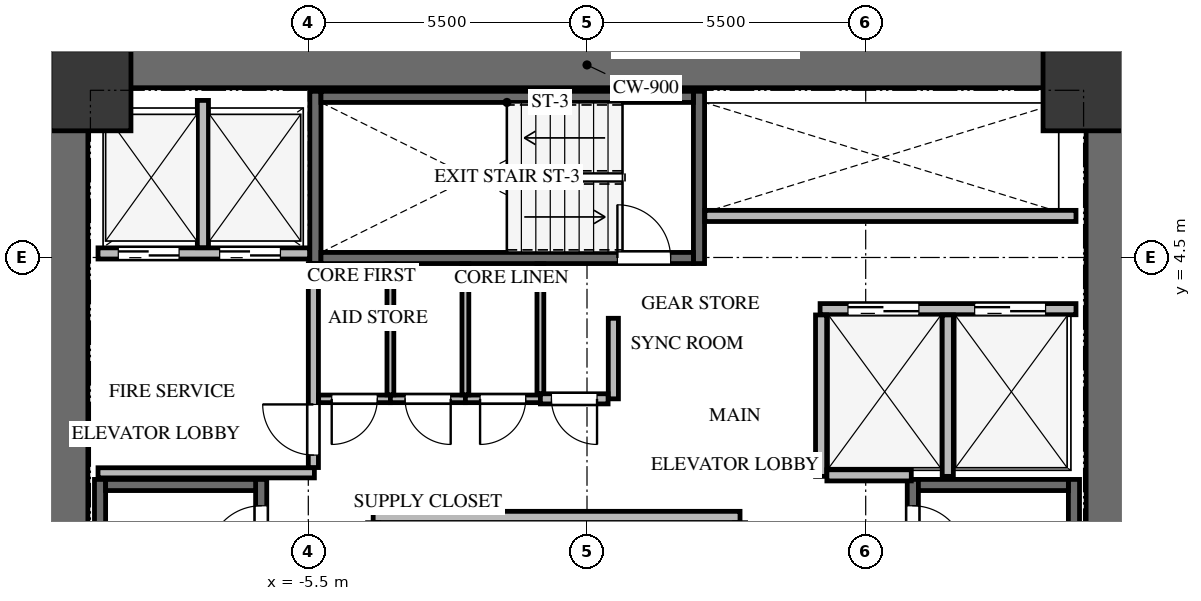
"""IFC4 building model, lengths in metres.
Left out: names, types, materials, properties, quantities, classifications, styles, units other than length and angle.
Written with IfcOpenShell. Run it as: python <this file> out.ifc"""

import sys

from ifc_helpers import new_model, si_unit, direction, frame, frame_2d, origin, origin_2d, place, context, subcontext, project, spatial, rectangle, extrude, source, transform, mapped, element, fill, save


model = new_model("IFC4")
c1 = context("Model", 3, precision=1e-05, world=origin(), true_north=direction((0.0, 1.0)))
c2 = subcontext(c1, "Body", "Model", "MODEL_VIEW")
j1 = project(units=[si_unit("LENGTHUNIT", "METRE"), si_unit("PLANEANGLEUNIT", "RADIAN")], contexts=[c1])
p1 = place(None, origin())
s1 = spatial("IfcSite", under=j1, at=p1, CompositionType="ELEMENT")
p2 = place(p1, origin())
s2 = spatial("IfcBuilding", under=s1, at=p2, CompositionType="ELEMENT")
p3 = place(p2, frame((0.0, 0.0, 81.3)))
s3 = spatial("IfcBuildingStorey", under=s2, at=p3, CompositionType="ELEMENT", Elevation=81.3)
for number, where, z_axis, x_axis in (
    (1, (-10.3, -8.75, 0.0), (0.0, 0.0, 1.0), (0.0, 1.0, 0.0)),
    (2, (10.3, -8.75, 0.0), (0.0, 0.0, 1.0), (0.0, 1.0, 0.0)),
):
    element("IfcWall", number, at=place(p3, frame(where, z_axis=z_axis, x_axis=x_axis)), inside=s3, PredefinedType="SHEAR", context=c2, shape_type="SweptSolid", body=[
        extrude(rectangle(XDim=17.5, YDim=0.9, at=frame_2d((8.75, 0.0))), origin(), (0.0, 0.0, 1.0), 3.0),
    ])
p4 = place(p3, frame((-9.85, 8.3, 0.0), z_axis=(0.0, 0.0, 1.0), x_axis=(1.0, 0.0, 0.0)))
e3 = element("IfcWall", 3, at=p4, inside=s3, PredefinedType="SHEAR", context=c2, shape_type="SweptSolid", body=[
    extrude(rectangle(XDim=19.7, YDim=0.9, at=frame_2d((9.85, 0.0))), origin(), (0.0, 0.0, 1.0), 3.0),
])
p5 = place(p3, frame((-6.43, -7.77, -0.24), z_axis=(0.0, 0.0, 1.0), x_axis=(0.0, 1.0, 0.0)))
e4 = element("IfcWall", 4, at=p5, inside=s3, PredefinedType="SHEAR", context=c2, shape_type="SweptSolid", body=[
    extrude(rectangle(XDim=7.89, YDim=0.22, at=frame_2d((3.945, 0.0))), origin(), (0.0, 0.0, 1.0), 3.0),
])
p6 = place(p5, frame((6.32, 0.0, 0.0)))
e5 = element("IfcOpeningElement", 5, at=p6, cuts=e4, PredefinedType="OPENING", context=c2, shape_type="SweptSolid", body=[
    extrude(rectangle(XDim=1.05, YDim=2.15, at=frame_2d((0.525, 1.075))), frame((0.0, 0.12, 0.0), z_axis=(0.0, -1.0, 0.0), x_axis=(1.0, 0.0, 0.0)), (0.0, 0.0, 1.0), 0.24),
])
p7 = place(p3, frame((-9.61, 0.12, -0.24), z_axis=(0.0, 0.0, 1.0), x_axis=(0.0, -1.0, 0.0)))
e6 = element("IfcWall", 6, at=p7, inside=s3, PredefinedType="SHEAR", context=c2, shape_type="SweptSolid", body=[
    extrude(rectangle(XDim=7.89, YDim=0.22, at=frame_2d((3.945, 0.0))), origin(), (0.0, 0.0, 1.0), 3.0),
])
p8 = place(p3, frame((-6.54, 0.01, -0.24), z_axis=(0.0, 0.0, 1.0), x_axis=(-1.0, 0.0, 0.0)))
e7 = element("IfcWall", 7, at=p8, inside=s3, PredefinedType="SHEAR", context=c2, shape_type="SweptSolid", body=[
    extrude(rectangle(XDim=2.96, YDim=0.22, at=frame_2d((1.48, 0.0))), origin(), (0.0, 0.0, 1.0), 3.0),
])
p9 = place(p3, frame((9.61, -7.77, -0.24), z_axis=(0.0, 0.0, 1.0), x_axis=(0.0, 1.0, 0.0)))
e8 = element("IfcWall", 8, at=p9, inside=s3, PredefinedType="SHEAR", context=c2, shape_type="SweptSolid", body=[
    extrude(rectangle(XDim=7.89, YDim=0.22, at=frame_2d((3.945, 0.0))), origin(), (0.0, 0.0, 1.0), 3.0),
])
p10 = place(p3, frame((6.43, 0.12, -0.24), z_axis=(0.0, 0.0, 1.0), x_axis=(0.0, -1.0, 0.0)))
e9 = element("IfcWall", 9, at=p10, inside=s3, PredefinedType="SHEAR", context=c2, shape_type="SweptSolid", body=[
    extrude(rectangle(XDim=7.89, YDim=0.22, at=frame_2d((3.945, 0.0))), origin(), (0.0, 0.0, 1.0), 3.0),
])
p11 = place(p10, frame((0.52, 0.0, 0.0)))
e10 = element("IfcOpeningElement", 10, at=p11, cuts=e9, PredefinedType="OPENING", context=c2, shape_type="SweptSolid", body=[
    extrude(rectangle(XDim=1.05, YDim=2.15, at=frame_2d((0.525, 1.075))), frame((0.0, 0.12, 0.0), z_axis=(0.0, -1.0, 0.0), x_axis=(1.0, 0.0, 0.0)), (0.0, 0.0, 1.0), 0.24),
])
p12 = place(p3, frame((9.5, 0.01, -0.24), z_axis=(0.0, 0.0, 1.0), x_axis=(-1.0, 0.0, 0.0)))
e11 = element("IfcWall", 11, at=p12, inside=s3, PredefinedType="SHEAR", context=c2, shape_type="SweptSolid", body=[
    extrude(rectangle(XDim=2.96, YDim=0.22, at=frame_2d((1.48, 0.0))), origin(), (0.0, 0.0, 1.0), 3.0),
])
for number, where, z_axis, x_axis in (
    (12, (2.21, 4.38, -0.24), (0.0, 0.0, 1.0), (0.0, 1.0, 0.0)),
    (13, (-5.36, 7.78, -0.24), (0.0, 0.0, 1.0), (0.0, -1.0, 0.0)),
):
    element("IfcWall", number, at=place(p3, frame(where, z_axis=z_axis, x_axis=x_axis)), inside=s3, PredefinedType="SHEAR", context=c2, shape_type="SweptSolid", body=[
        extrude(rectangle(XDim=3.4, YDim=0.22, at=frame_2d((1.7, 0.0))), origin(), (0.0, 0.0, 1.0), 3.0),
    ])
p13 = place(p3, frame((-5.25, 4.49, -0.24), z_axis=(0.0, 0.0, 1.0), x_axis=(1.0, 0.0, 0.0)))
e14 = element("IfcWall", 14, at=p13, inside=s3, PredefinedType="SHEAR", context=c2, shape_type="SweptSolid", body=[
    extrude(rectangle(XDim=7.35, YDim=0.22, at=frame_2d((3.675, 0.0))), origin(), (0.0, 0.0, 1.0), 3.0),
])
p14 = place(p13, frame((5.85, 0.0, 0.0)))
e15 = element("IfcOpeningElement", 15, at=p14, cuts=e14, PredefinedType="OPENING", context=c2, shape_type="SweptSolid", body=[
    extrude(rectangle(XDim=1.05, YDim=2.15, at=frame_2d((0.525, 1.075))), frame((0.0, 0.12, 0.0), z_axis=(0.0, -1.0, 0.0), x_axis=(1.0, 0.0, 0.0)), (0.0, 0.0, 1.0), 0.24),
])
p15 = place(p3, frame((2.1, 7.67, -0.24), z_axis=(0.0, 0.0, 1.0), x_axis=(-1.0, 0.0, 0.0)))
e16 = element("IfcWall", 16, at=p15, inside=s3, PredefinedType="SHEAR", context=c2, shape_type="SweptSolid", body=[
    extrude(rectangle(XDim=7.35, YDim=0.22, at=frame_2d((3.675, 0.0))), origin(), (0.0, 0.0, 1.0), 3.0),
])
m1 = source(origin(), c2, "Body", "SweptSolid", [
    extrude(rectangle(XDim=1.6, YDim=1.6, at=origin_2d()), origin(), (0.0, 0.0, 1.0), 3.0),
])
for number, where, z_axis, x_axis in (
    (17, (9.8, 7.8, -0.24), (0.0, 0.0, 1.0), (1.0, 0.0, 0.0)),
    (18, (-9.8, 7.8, -0.24), (0.0, 0.0, 1.0), (1.0, 0.0, 0.0)),
):
    element("IfcColumn", number, at=place(p3, frame(where, z_axis=z_axis, x_axis=x_axis)), inside=s3, PredefinedType="COLUMN", context=c2, shape_type="MappedRepresentation", body=[
        mapped(m1, transform((0.0, 0.0, 0.0), x_axis=(1.0, 0.0, 0.0), y_axis=(0.0, 1.0, 0.0), z_axis=(0.0, 0.0, 1.0), scale=1.0)),
    ])
p16 = place(p3, frame((-9.65, 4.58, 0.0), z_axis=(0.0, 0.0, 1.0), x_axis=(1.0, 0.0, 0.0)))
e19 = element("IfcWall", 19, at=p16, inside=s3, PredefinedType="SOLIDWALL", context=c2, shape_type="SweptSolid", body=[
    extrude(rectangle(XDim=4.175, YDim=0.22, at=frame_2d((2.087, 0.0))), origin(), (0.0, 0.0, 1.0), 2.745),
])
p17 = place(p16, frame((0.4, 0.0, 0.0)))
e20 = element("IfcOpeningElement", 20, at=p17, cuts=e19, PredefinedType="OPENING", context=c2, shape_type="SweptSolid", body=[
    extrude(rectangle(XDim=1.2, YDim=2.15, at=frame_2d((0.6, 1.075))), frame((0.0, 0.12, 0.0), z_axis=(0.0, -1.0, 0.0), x_axis=(1.0, 0.0, 0.0)), (0.0, 0.0, 1.0), 0.24),
])
p18 = place(p16, frame((2.4, 0.0, 0.0)))
e21 = element("IfcOpeningElement", 21, at=p18, cuts=e19, PredefinedType="OPENING", context=c2, shape_type="SweptSolid", body=[
    extrude(rectangle(XDim=1.2, YDim=2.15, at=frame_2d((0.6, 1.075))), frame((0.0, 0.12, 0.0), z_axis=(0.0, -1.0, 0.0), x_axis=(1.0, 0.0, 0.0)), (0.0, 0.0, 1.0), 0.24),
])
p19 = place(p3, frame((-7.58, 4.694, 0.0), z_axis=(0.0, 0.0, 1.0), x_axis=(0.0, 1.0, 0.0)))
e22 = element("IfcWall", 22, at=p19, inside=s3, PredefinedType="SOLIDWALL", context=c2, shape_type="SweptSolid", body=[
    extrude(rectangle(XDim=2.906, YDim=0.22, at=frame_2d((1.453, 0.0))), origin(), (0.0, 0.0, 1.0), 2.745),
])
p20 = place(p3, frame((-9.65, 0.25, 0.0), z_axis=(0.0, 0.0, 1.0), x_axis=(1.0, 0.0, 0.0)))
e23 = element("IfcWall", 23, at=p20, inside=s3, PredefinedType="SOLIDWALL", context=c2, shape_type="SweptSolid", body=[
    extrude(rectangle(XDim=4.27, YDim=0.2, at=frame_2d((2.135, 0.0))), origin(), (0.0, 0.0, 1.0), 2.745),
])
p21 = place(p3, frame((-5.4, 0.354, 0.0), z_axis=(0.0, 0.0, 1.0), x_axis=(0.0, 1.0, 0.0)))
e24 = element("IfcWall", 24, at=p21, inside=s3, PredefinedType="SOLIDWALL", context=c2, shape_type="SweptSolid", body=[
    extrude(rectangle(XDim=4.026, YDim=0.2, at=frame_2d((2.013, 0.0))), origin(), (0.0, 0.0, 1.0), 2.745),
])
p22 = place(p21, frame((0.246, 0.0, 0.0)))
e25 = element("IfcOpeningElement", 25, at=p22, cuts=e24, PredefinedType="OPENING", context=c2, shape_type="SweptSolid", body=[
    extrude(rectangle(XDim=1.0, YDim=2.15, at=frame_2d((0.5, 1.075))), frame((0.0, 0.11, 0.0), z_axis=(0.0, -1.0, 0.0), x_axis=(1.0, 0.0, 0.0)), (0.0, 0.0, 1.0), 0.22),
])
p23 = place(p3, frame((4.6, 3.48, 0.0), z_axis=(0.0, 0.0, 1.0), x_axis=(1.0, 0.0, 0.0)))
e26 = element("IfcWall", 26, at=p23, inside=s3, PredefinedType="SOLIDWALL", context=c2, shape_type="SweptSolid", body=[
    extrude(rectangle(XDim=5.05, YDim=0.22, at=frame_2d((2.525, 0.0))), origin(), (0.0, 0.0, 1.0), 2.745),
])
p24 = place(p23, frame((0.55, 0.0, 0.0)))
e27 = element("IfcOpeningElement", 27, at=p24, cuts=e26, PredefinedType="OPENING", context=c2, shape_type="SweptSolid", body=[
    extrude(rectangle(XDim=1.4, YDim=2.15, at=frame_2d((0.7, 1.075))), frame((0.0, 0.12, 0.0), z_axis=(0.0, -1.0, 0.0), x_axis=(1.0, 0.0, 0.0)), (0.0, 0.0, 1.0), 0.24),
])
p25 = place(p23, frame((3.05, 0.0, 0.0)))
e28 = element("IfcOpeningElement", 28, at=p25, cuts=e26, PredefinedType="OPENING", context=c2, shape_type="SweptSolid", body=[
    extrude(rectangle(XDim=1.4, YDim=2.15, at=frame_2d((0.7, 1.075))), frame((0.0, 0.12, 0.0), z_axis=(0.0, -1.0, 0.0), x_axis=(1.0, 0.0, 0.0)), (0.0, 0.0, 1.0), 0.24),
])
for number, where, z_axis, x_axis in (
    (29, (4.62, 0.18, 0.0), (0.0, 0.0, 1.0), (0.0, 1.0, 0.0)),
    (30, (7.12, 0.18, 0.0), (0.0, 0.0, 1.0), (0.0, 1.0, 0.0)),
):
    element("IfcWall", number, at=place(p3, frame(where, z_axis=z_axis, x_axis=x_axis)), inside=s3, PredefinedType="SOLIDWALL", context=c2, shape_type="SweptSolid", body=[
        extrude(rectangle(XDim=3.186, YDim=0.22, at=frame_2d((1.593, 0.0))), origin(), (0.0, 0.0, 1.0), 2.745),
    ])
p26 = place(p3, frame((4.734, 0.2, 0.0), z_axis=(0.0, 0.0, 1.0), x_axis=(1.0, 0.0, 0.0)))
e31 = element("IfcWall", 31, at=p26, inside=s3, PredefinedType="SOLIDWALL", context=c2, shape_type="SweptSolid", body=[
    extrude(rectangle(XDim=1.666, YDim=0.22, at=frame_2d((0.833, 0.0))), origin(), (0.0, 0.0, 1.0), 2.745),
])
p27 = place(p3, frame((-4.22, -0.62, 0.0), z_axis=(0.0, 0.0, 1.0), x_axis=(1.0, 0.0, 0.0)))
e32 = element("IfcWall", 32, at=p27, inside=s3, PredefinedType="SOLIDWALL", context=c2, shape_type="SweptSolid", body=[
    extrude(rectangle(XDim=7.24, YDim=0.22, at=frame_2d((3.62, 0.0))), origin(), (0.0, 0.0, 1.0), 2.745),
])
p28 = place(p3, frame((2.325, 5.32, 0.0), z_axis=(0.0, 0.0, 1.0), x_axis=(1.0, 0.0, 0.0)))
e33 = element("IfcWall", 33, at=p28, inside=s3, PredefinedType="SOLIDWALL", context=c2, shape_type="SweptSolid", body=[
    extrude(rectangle(XDim=7.325, YDim=0.22, at=frame_2d((3.663, 0.0))), origin(), (0.0, 0.0, 1.0), 2.745),
])
p29 = place(p3, frame((-3.88, 1.71, 0.0), z_axis=(0.0, 0.0, 1.0), x_axis=(-1.0, 0.0, 0.0)))
e34 = element("IfcWall", 34, at=p29, inside=s3, PredefinedType="PARTITIONING", context=c2, shape_type="SweptSolid", body=[
    extrude(rectangle(XDim=1.416, YDim=0.15, at=frame_2d((0.708, 0.0))), origin(), (0.0, 0.0, 1.0), 2.745),
])
p30 = place(p29, frame((0.258, 0.0, 0.0)))
e35 = element("IfcOpeningElement", 35, at=p30, cuts=e34, PredefinedType="OPENING", context=c2, shape_type="SweptSolid", body=[
    extrude(rectangle(XDim=0.9, YDim=2.05, at=frame_2d((0.45, 1.025))), frame((0.0, 0.085, 0.0), z_axis=(0.0, -1.0, 0.0), x_axis=(1.0, 0.0, 0.0)), (0.0, 0.0, 1.0), 0.17),
])
p31 = place(p3, frame((-2.4, 1.71, 0.0), z_axis=(0.0, 0.0, 1.0), x_axis=(-1.0, 0.0, 0.0)))
e36 = element("IfcWall", 36, at=p31, inside=s3, PredefinedType="PARTITIONING", context=c2, shape_type="SweptSolid", body=[
    extrude(rectangle(XDim=1.48, YDim=0.15, at=frame_2d((0.74, 0.0))), origin(), (0.0, 0.0, 1.0), 2.745),
])
p32 = place(p31, frame((0.29, 0.0, 0.0)))
e37 = element("IfcOpeningElement", 37, at=p32, cuts=e36, PredefinedType="OPENING", context=c2, shape_type="SweptSolid", body=[
    extrude(rectangle(XDim=0.9, YDim=2.05, at=frame_2d((0.45, 1.025))), frame((0.0, 0.085, 0.0), z_axis=(0.0, -1.0, 0.0), x_axis=(1.0, 0.0, 0.0)), (0.0, 0.0, 1.0), 0.17),
])
p33 = place(p3, frame((-0.92, 1.71, 0.0), z_axis=(0.0, 0.0, 1.0), x_axis=(-1.0, 0.0, 0.0)))
e38 = element("IfcWall", 38, at=p33, inside=s3, PredefinedType="PARTITIONING", context=c2, shape_type="SweptSolid", body=[
    extrude(rectangle(XDim=1.48, YDim=0.15, at=frame_2d((0.74, 0.0))), origin(), (0.0, 0.0, 1.0), 2.745),
])
p34 = place(p33, frame((0.29, 0.0, 0.0)))
e39 = element("IfcOpeningElement", 39, at=p34, cuts=e38, PredefinedType="OPENING", context=c2, shape_type="SweptSolid", body=[
    extrude(rectangle(XDim=0.9, YDim=2.05, at=frame_2d((0.45, 1.025))), frame((0.0, 0.085, 0.0), z_axis=(0.0, -1.0, 0.0), x_axis=(1.0, 0.0, 0.0)), (0.0, 0.0, 1.0), 0.17),
])
p35 = place(p3, frame((0.52, 3.3, 0.0), z_axis=(0.0, 0.0, 1.0), x_axis=(0.0, -1.0, 0.0)))
e40 = element("IfcWall", 40, at=p35, inside=s3, PredefinedType="SOLIDWALL", context=c2, shape_type="SweptSolid", body=[
    extrude(rectangle(XDim=1.59, YDim=0.2, at=frame_2d((0.795, 0.0))), origin(), (0.0, 0.0, 1.0), 2.745),
])
p36 = place(p3, frame((0.416, 1.71, 0.0), z_axis=(0.0, 0.0, 1.0), x_axis=(-1.0, 0.0, 0.0)))
e41 = element("IfcWall", 41, at=p36, inside=s3, PredefinedType="SOLIDWALL", context=c2, shape_type="SweptSolid", body=[
    extrude(rectangle(XDim=1.336, YDim=0.2, at=frame_2d((0.668, 0.0))), origin(), (0.0, 0.0, 1.0), 2.745),
])
p37 = place(p36, frame((0.218, 0.0, 0.0)))
e42 = element("IfcOpeningElement", 42, at=p37, cuts=e41, PredefinedType="OPENING", context=c2, shape_type="SweptSolid", body=[
    extrude(rectangle(XDim=0.9, YDim=2.05, at=frame_2d((0.45, 1.025))), frame((0.0, 0.11, 0.0), z_axis=(0.0, -1.0, 0.0), x_axis=(1.0, 0.0, 0.0)), (0.0, 0.0, 1.0), 0.22),
])
for number, where, z_axis, x_axis in (
    (43, (-3.88, 4.375, 0.0), (0.0, 0.0, 1.0), (0.0, -1.0, 0.0)),
    (44, (-2.4, 4.375, 0.0), (0.0, 0.0, 1.0), (0.0, -1.0, 0.0)),
):
    element("IfcWall", number, at=place(p3, frame(where, z_axis=z_axis, x_axis=x_axis)), inside=s3, PredefinedType="PARTITIONING", context=c2, shape_type="SweptSolid", body=[
        extrude(rectangle(XDim=2.586, YDim=0.135, at=frame_2d((1.293, 0.0))), origin(), (0.0, 0.0, 1.0), 2.745),
    ])
p38 = place(p3, frame((-0.92, 4.375, 0.0), z_axis=(0.0, 0.0, 1.0), x_axis=(0.0, -1.0, 0.0)))
e45 = element("IfcWall", 45, at=p38, inside=s3, PredefinedType="PARTITIONING", context=c2, shape_type="SweptSolid", body=[
    extrude(rectangle(XDim=2.561, YDim=0.135, at=frame_2d((1.281, 0.0))), origin(), (0.0, 0.0, 1.0), 2.745),
])
m2 = source(origin(), c2, "Body", "SweptSolid", [
    extrude(rectangle(XDim=1.05, YDim=2.15, at=frame_2d((0.525, 1.075))), frame((0.0, 0.025, 0.0), z_axis=(0.0, -1.0, 0.0), x_axis=(1.0, 0.0, 0.0)), (0.0, 0.0, 1.0), 0.05),
])
p39 = place(p6, origin())
e46 = element("IfcDoor", 46, at=p39, inside=s3, OperationType="SINGLE_SWING_LEFT", PredefinedType="DOOR", context=c2, shape_type="MappedRepresentation", body=[
    mapped(m2, transform((0.0, 0.0, 0.0), x_axis=(1.0, 0.0, 0.0), y_axis=(0.0, 1.0, 0.0), z_axis=(0.0, 0.0, 1.0), scale=1.0)),
])
fill(e5, e46)
m3 = source(origin(), c2, "Body", "SweptSolid", [
    extrude(rectangle(XDim=1.05, YDim=2.15, at=frame_2d((0.525, 1.075))), frame((0.0, 0.025, 0.0), z_axis=(0.0, -1.0, 0.0), x_axis=(1.0, 0.0, 0.0)), (0.0, 0.0, 1.0), 0.05),
])
p40 = place(p11, origin())
e47 = element("IfcDoor", 47, at=p40, inside=s3, OperationType="SINGLE_SWING_RIGHT", PredefinedType="DOOR", context=c2, shape_type="MappedRepresentation", body=[
    mapped(m3, transform((0.0, 0.0, 0.0), x_axis=(1.0, 0.0, 0.0), y_axis=(0.0, 1.0, 0.0), z_axis=(0.0, 0.0, 1.0), scale=1.0)),
])
fill(e10, e47)
p41 = place(p14, origin())
e48 = element("IfcDoor", 48, at=p41, inside=s3, OperationType="SINGLE_SWING_LEFT", PredefinedType="DOOR", context=c2, shape_type="MappedRepresentation", body=[
    mapped(m2, transform((0.0, 0.0, 0.0), x_axis=(1.0, 0.0, 0.0), y_axis=(0.0, 1.0, 0.0), z_axis=(0.0, 0.0, 1.0), scale=1.0)),
])
fill(e15, e48)
m4 = source(origin(), c2, "Body", "SweptSolid", [
    extrude(rectangle(XDim=1.2, YDim=2.15, at=frame_2d((0.6, 1.075))), frame((0.0, 0.025, 0.0), z_axis=(0.0, -1.0, 0.0), x_axis=(1.0, 0.0, 0.0)), (0.0, 0.0, 1.0), 0.05),
])
p42 = place(p17, origin())
e49 = element("IfcDoor", 49, at=p42, inside=s3, OperationType="DOUBLE_DOOR_SLIDING", PredefinedType="DOOR", context=c2, shape_type="MappedRepresentation", body=[
    mapped(m4, transform((0.0, 0.0, 0.0), x_axis=(1.0, 0.0, 0.0), y_axis=(0.0, 1.0, 0.0), z_axis=(0.0, 0.0, 1.0), scale=1.0)),
])
fill(e20, e49)
p43 = place(p18, origin())
e50 = element("IfcDoor", 50, at=p43, inside=s3, OperationType="DOUBLE_DOOR_SLIDING", PredefinedType="DOOR", context=c2, shape_type="MappedRepresentation", body=[
    mapped(m4, transform((0.0, 0.0, 0.0), x_axis=(1.0, 0.0, 0.0), y_axis=(0.0, 1.0, 0.0), z_axis=(0.0, 0.0, 1.0), scale=1.0)),
])
fill(e21, e50)
m5 = source(origin(), c2, "Body", "SweptSolid", [
    extrude(rectangle(XDim=1.0, YDim=2.15, at=frame_2d((0.5, 1.075))), frame((0.0, 0.025, 0.0), z_axis=(0.0, -1.0, 0.0), x_axis=(1.0, 0.0, 0.0)), (0.0, 0.0, 1.0), 0.05),
])
p44 = place(p22, origin())
e51 = element("IfcDoor", 51, at=p44, inside=s3, OperationType="SINGLE_SWING_RIGHT", PredefinedType="DOOR", context=c2, shape_type="MappedRepresentation", body=[
    mapped(m5, transform((0.0, 0.0, 0.0), x_axis=(1.0, 0.0, 0.0), y_axis=(0.0, 1.0, 0.0), z_axis=(0.0, 0.0, 1.0), scale=1.0)),
])
fill(e25, e51)
m6 = source(origin(), c2, "Body", "SweptSolid", [
    extrude(rectangle(XDim=1.4, YDim=2.15, at=frame_2d((0.7, 1.075))), frame((0.0, 0.025, 0.0), z_axis=(0.0, -1.0, 0.0), x_axis=(1.0, 0.0, 0.0)), (0.0, 0.0, 1.0), 0.05),
])
p45 = place(p24, origin())
e52 = element("IfcDoor", 52, at=p45, inside=s3, OperationType="DOUBLE_DOOR_SLIDING", PredefinedType="DOOR", context=c2, shape_type="MappedRepresentation", body=[
    mapped(m6, transform((0.0, 0.0, 0.0), x_axis=(1.0, 0.0, 0.0), y_axis=(0.0, 1.0, 0.0), z_axis=(0.0, 0.0, 1.0), scale=1.0)),
])
fill(e27, e52)
p46 = place(p25, origin())
e53 = element("IfcDoor", 53, at=p46, inside=s3, OperationType="DOUBLE_DOOR_SLIDING", PredefinedType="DOOR", context=c2, shape_type="MappedRepresentation", body=[
    mapped(m6, transform((0.0, 0.0, 0.0), x_axis=(1.0, 0.0, 0.0), y_axis=(0.0, 1.0, 0.0), z_axis=(0.0, 0.0, 1.0), scale=1.0)),
])
fill(e28, e53)
m7 = source(origin(), c2, "Body", "SweptSolid", [
    extrude(rectangle(XDim=0.9, YDim=2.05, at=frame_2d((0.45, 1.025))), frame((0.0, 0.025, 0.0), z_axis=(0.0, -1.0, 0.0), x_axis=(1.0, 0.0, 0.0)), (0.0, 0.0, 1.0), 0.05),
])
p47 = place(p30, origin())
e54 = element("IfcDoor", 54, at=p47, inside=s3, OperationType="SINGLE_SWING_RIGHT", PredefinedType="DOOR", context=c2, shape_type="MappedRepresentation", body=[
    mapped(m7, transform((0.0, 0.0, 0.0), x_axis=(1.0, 0.0, 0.0), y_axis=(0.0, 1.0, 0.0), z_axis=(0.0, 0.0, 1.0), scale=1.0)),
])
fill(e35, e54)
m8 = source(origin(), c2, "Body", "SweptSolid", [
    extrude(rectangle(XDim=0.9, YDim=2.05, at=frame_2d((0.45, 1.025))), frame((0.0, 0.025, 0.0), z_axis=(0.0, -1.0, 0.0), x_axis=(1.0, 0.0, 0.0)), (0.0, 0.0, 1.0), 0.05),
])
p48 = place(p32, origin())
e55 = element("IfcDoor", 55, at=p48, inside=s3, OperationType="SINGLE_SWING_LEFT", PredefinedType="DOOR", context=c2, shape_type="MappedRepresentation", body=[
    mapped(m8, transform((0.0, 0.0, 0.0), x_axis=(1.0, 0.0, 0.0), y_axis=(0.0, 1.0, 0.0), z_axis=(0.0, 0.0, 1.0), scale=1.0)),
])
fill(e37, e55)
p49 = place(p34, origin())
e56 = element("IfcDoor", 56, at=p49, inside=s3, OperationType="SINGLE_SWING_RIGHT", PredefinedType="DOOR", context=c2, shape_type="MappedRepresentation", body=[
    mapped(m7, transform((0.0, 0.0, 0.0), x_axis=(1.0, 0.0, 0.0), y_axis=(0.0, 1.0, 0.0), z_axis=(0.0, 0.0, 1.0), scale=1.0)),
])
fill(e39, e56)
p50 = place(p37, origin())
e57 = element("IfcDoor", 57, at=p50, inside=s3, OperationType="SINGLE_SWING_LEFT", PredefinedType="DOOR", context=c2, shape_type="MappedRepresentation", body=[
    mapped(m8, transform((0.0, 0.0, 0.0), x_axis=(1.0, 0.0, 0.0), y_axis=(0.0, 1.0, 0.0), z_axis=(0.0, 0.0, 1.0), scale=1.0)),
])
fill(e42, e57)
save(model, sys.argv[1])
